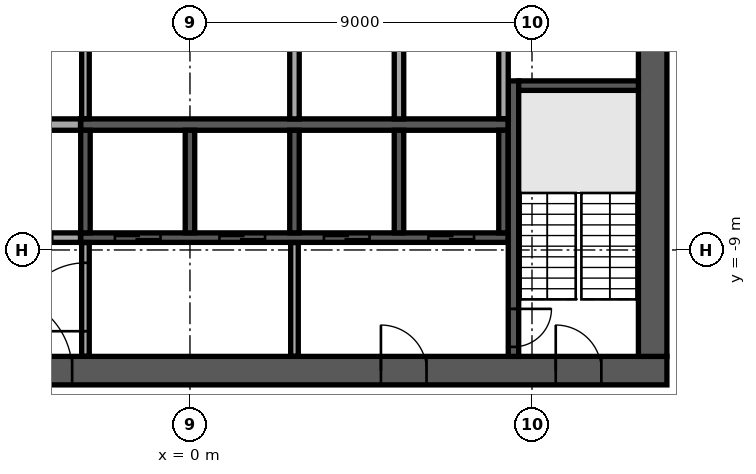
"""IFC4 building model, lengths in metres.
Left out: names, types, materials, properties, quantities, classifications, styles, units other than length and angle.
Written with IfcOpenShell. Run it as: python <this file> out.ifc"""

import sys

from ifc_helpers import new_model, si_unit, direction, frame, frame_2d, origin, place, context, subcontext, project, spatial, rectangle, extrude, element, fill, save


model = new_model("IFC4")
c1 = context("Model", 3, precision=1e-05, world=origin(), true_north=direction((0.0, 1.0)))
c2 = subcontext(c1, "Body", "Model", "MODEL_VIEW")
j1 = project(units=[si_unit("LENGTHUNIT", "METRE"), si_unit("PLANEANGLEUNIT", "RADIAN")], contexts=[c1])
p1 = place(None, origin())
s1 = spatial("IfcSite", under=j1, at=p1, CompositionType="ELEMENT")
p2 = place(p1, origin())
s2 = spatial("IfcBuilding", under=s1, at=p2, CompositionType="ELEMENT")
p3 = place(p2, frame((0.0, 0.0, 282.9)))
s3 = spatial("IfcBuildingStorey", under=s2, at=p3, CompositionType="ELEMENT", Elevation=282.9)
p4 = place(p3, frame((-12.55, -12.175, 0.0), z_axis=(0.0, 0.0, 1.0), x_axis=(1.0, 0.0, 0.0)))
e1 = element("IfcWall", 1, at=p4, inside=s3, PredefinedType="SHEAR", context=c2, shape_type="SweptSolid", body=[
    extrude(rectangle(XDim=25.1, YDim=0.75, at=frame_2d((12.55, 0.0))), origin(), (0.0, 0.0, 1.0), 3.64),
])
p5 = place(p4, frame((7.45, 0.0, 0.0)))
e2 = element("IfcOpeningElement", 2, at=p5, cuts=e1, PredefinedType="OPENING", context=c2, shape_type="SweptSolid", body=[
    extrude(rectangle(XDim=2.0, YDim=2.1, at=frame_2d((1.0, 1.05))), frame((0.0, 0.385, 0.0), z_axis=(0.0, -1.0, 0.0), x_axis=(1.0, 0.0, 0.0)), (0.0, 0.0, 1.0), 0.77),
])
p6 = place(p4, frame((17.575, 0.0, 0.0)))
e3 = element("IfcOpeningElement", 3, at=p6, cuts=e1, PredefinedType="OPENING", context=c2, shape_type="SweptSolid", body=[
    extrude(rectangle(XDim=1.2, YDim=2.1, at=frame_2d((0.6, 1.05))), frame((0.0, 0.385, 0.0), z_axis=(0.0, -1.0, 0.0), x_axis=(1.0, 0.0, 0.0)), (0.0, 0.0, 1.0), 0.77),
])
p7 = place(p4, frame((1.725, 0.0, 0.0)))
e4 = element("IfcOpeningElement", 4, at=p7, cuts=e1, PredefinedType="OPENING", context=c2, shape_type="SweptSolid", body=[
    extrude(rectangle(XDim=1.2, YDim=2.1, at=frame_2d((0.6, 1.05))), frame((0.0, 0.385, 0.0), z_axis=(0.0, -1.0, 0.0), x_axis=(1.0, 0.0, 0.0)), (0.0, 0.0, 1.0), 0.77),
])
p8 = place(p4, frame((22.175, 0.0, 0.0)))
e5 = element("IfcOpeningElement", 5, at=p8, cuts=e1, PredefinedType="OPENING", context=c2, shape_type="SweptSolid", body=[
    extrude(rectangle(XDim=1.2, YDim=2.1, at=frame_2d((0.6, 1.05))), frame((0.0, 0.385, 0.0), z_axis=(0.0, -1.0, 0.0), x_axis=(1.0, 0.0, 0.0)), (0.0, 0.0, 1.0), 0.77),
])
p9 = place(p3, frame((12.175, -11.8, 0.0), z_axis=(0.0, 0.0, 1.0), x_axis=(0.0, 1.0, 0.0)))
e6 = element("IfcWall", 6, at=p9, inside=s3, PredefinedType="SHEAR", context=c2, shape_type="SweptSolid", body=[
    extrude(rectangle(XDim=23.6, YDim=0.75, at=frame_2d((11.8, 0.0))), origin(), (0.0, 0.0, 1.0), 3.64),
])
p10 = place(p9, frame((10.6, 0.0, 0.0)))
e7 = element("IfcOpeningElement", 7, at=p10, cuts=e6, PredefinedType="OPENING", context=c2, shape_type="SweptSolid", body=[
    extrude(rectangle(XDim=2.4, YDim=2.4, at=frame_2d((1.2, 1.2))), frame((0.0, 0.385, 0.0), z_axis=(0.0, -1.0, 0.0), x_axis=(1.0, 0.0, 0.0)), (0.0, 0.0, 1.0), 0.77),
])
p11 = place(p3, frame((-2.875, -5.7, 0.0), z_axis=(0.0, 0.0, 1.0), x_axis=(1.0, 0.0, 0.0)))
e8 = element("IfcWall", 8, at=p11, inside=s3, PredefinedType="SOLIDWALL", context=c2, shape_type="SweptSolid", body=[
    extrude(rectangle(XDim=11.25, YDim=0.3, at=frame_2d((5.625, 0.0))), origin(), (0.0, 0.0, 1.0), 3.64),
])
for number, where, z_axis, x_axis in (
    (9, (2.75, -5.55, 0.0), (0.0, 0.0, 1.0), (0.0, 1.0, 0.0)),
    (10, (5.5, -5.55, 0.0), (0.0, 0.0, 1.0), (0.0, 1.0, 0.0)),
):
    element("IfcWall", number, at=place(p3, frame(where, z_axis=z_axis, x_axis=x_axis)), inside=s3, PredefinedType="SOLIDWALL", context=c2, shape_type="SweptSolid", body=[
        extrude(rectangle(XDim=2.7, YDim=0.25, at=frame_2d((1.35, 0.0))), origin(), (0.0, 0.0, 1.0), 3.64),
    ])
p12 = place(p3, frame((-2.875, -8.675, 0.0), z_axis=(0.0, 0.0, 1.0), x_axis=(1.0, 0.0, 0.0)))
e11 = element("IfcWall", 11, at=p12, inside=s3, PredefinedType="SOLIDWALL", context=c2, shape_type="SweptSolid", body=[
    extrude(rectangle(XDim=11.25, YDim=0.25, at=frame_2d((5.625, 0.0))), origin(), (0.0, 0.0, 1.0), 3.64),
])
p13 = place(p12, frame((0.9, 0.0, 0.0)))
e12 = element("IfcOpeningElement", 12, at=p13, cuts=e11, PredefinedType="OPENING", context=c2, shape_type="SweptSolid", body=[
    extrude(rectangle(XDim=1.2, YDim=2.1, at=frame_2d((0.6, 1.05))), frame((0.0, 0.135, 0.0), z_axis=(0.0, -1.0, 0.0), x_axis=(1.0, 0.0, 0.0)), (0.0, 0.0, 1.0), 0.27),
])
p14 = place(p12, frame((3.65, 0.0, 0.0)))
e13 = element("IfcOpeningElement", 13, at=p14, cuts=e11, PredefinedType="OPENING", context=c2, shape_type="SweptSolid", body=[
    extrude(rectangle(XDim=1.2, YDim=2.1, at=frame_2d((0.6, 1.05))), frame((0.0, 0.135, 0.0), z_axis=(0.0, -1.0, 0.0), x_axis=(1.0, 0.0, 0.0)), (0.0, 0.0, 1.0), 0.27),
])
p15 = place(p12, frame((6.4, 0.0, 0.0)))
e14 = element("IfcOpeningElement", 14, at=p15, cuts=e11, PredefinedType="OPENING", context=c2, shape_type="SweptSolid", body=[
    extrude(rectangle(XDim=1.2, YDim=2.1, at=frame_2d((0.6, 1.05))), frame((0.0, 0.135, 0.0), z_axis=(0.0, -1.0, 0.0), x_axis=(1.0, 0.0, 0.0)), (0.0, 0.0, 1.0), 0.27),
])
p16 = place(p12, frame((9.15, 0.0, 0.0)))
e15 = element("IfcOpeningElement", 15, at=p16, cuts=e11, PredefinedType="OPENING", context=c2, shape_type="SweptSolid", body=[
    extrude(rectangle(XDim=1.2, YDim=2.1, at=frame_2d((0.6, 1.05))), frame((0.0, 0.135, 0.0), z_axis=(0.0, -1.0, 0.0), x_axis=(1.0, 0.0, 0.0)), (0.0, 0.0, 1.0), 0.27),
])
for number, where, z_axis, x_axis in (
    (16, (-2.75, -8.55, 0.0), (0.0, 0.0, 1.0), (0.0, 1.0, 0.0)),
    (17, (0.0, -8.55, 0.0), (0.0, 0.0, 1.0), (0.0, 1.0, 0.0)),
    (18, (2.75, -8.55, 0.0), (0.0, 0.0, 1.0), (0.0, 1.0, 0.0)),
    (19, (5.5, -8.55, 0.0), (0.0, 0.0, 1.0), (0.0, 1.0, 0.0)),
    (20, (8.25, -8.55, 0.0), (0.0, 0.0, 1.0), (0.0, 1.0, 0.0)),
):
    element("IfcWall", number, at=place(p3, frame(where, z_axis=z_axis, x_axis=x_axis)), inside=s3, PredefinedType="SOLIDWALL", context=c2, shape_type="SweptSolid", body=[
        extrude(rectangle(XDim=2.7, YDim=0.25, at=frame_2d((1.35, 0.0))), origin(), (0.0, 0.0, 1.0), 3.64),
    ])
p17 = place(p3, frame((8.512, -4.55, 0.0), z_axis=(0.0, 0.0, 1.0), x_axis=(0.0, -1.0, 0.0)))
e21 = element("IfcWall", 21, at=p17, inside=s3, PredefinedType="SOLIDWALL", context=c2, shape_type="SweptSolid", body=[
    extrude(rectangle(XDim=7.25, YDim=0.275, at=frame_2d((3.625, 0.0))), origin(), (0.0, 0.0, 1.0), 3.64),
])
p18 = place(p17, frame((6.0, 0.0, 0.0)))
e22 = element("IfcOpeningElement", 22, at=p18, cuts=e21, PredefinedType="OPENING", context=c2, shape_type="SweptSolid", body=[
    extrude(rectangle(XDim=1.0, YDim=2.1, at=frame_2d((0.5, 1.05))), frame((0.0, 0.147, 0.0), z_axis=(0.0, -1.0, 0.0), x_axis=(1.0, 0.0, 0.0)), (0.0, 0.0, 1.0), 0.295),
])
p19 = place(p3, frame((8.65, -4.675, 0.0), z_axis=(0.0, 0.0, 1.0), x_axis=(1.0, 0.0, 0.0)))
e23 = element("IfcWall", 23, at=p19, inside=s3, PredefinedType="SOLIDWALL", context=c2, shape_type="SweptSolid", body=[
    extrude(rectangle(XDim=3.15, YDim=0.25, at=frame_2d((1.575, 0.0))), origin(), (0.0, 0.0, 1.0), 3.64),
])
p20 = place(p3, frame((-2.75, -11.795, 0.0), z_axis=(0.0, 0.0, 1.0), x_axis=(0.0, 1.0, 0.0)))
e24 = element("IfcWall", 24, at=p20, inside=s3, PredefinedType="PARTITIONING", context=c2, shape_type="SweptSolid", body=[
    extrude(rectangle(XDim=2.99, YDim=0.2, at=frame_2d((1.495, 0.0))), origin(), (0.0, 0.0, 1.0), 3.64),
])
p21 = place(p20, frame((0.657, 0.0, 0.0)))
e25 = element("IfcOpeningElement", 25, at=p21, cuts=e24, PredefinedType="OPENING", context=c2, shape_type="SweptSolid", body=[
    extrude(rectangle(XDim=1.8, YDim=2.1, at=frame_2d((0.9, 1.05))), frame((0.0, 0.11, 0.0), z_axis=(0.0, -1.0, 0.0), x_axis=(1.0, 0.0, 0.0)), (0.0, 0.0, 1.0), 0.22),
])
p22 = place(p3, frame((2.75, -11.795, 0.0), z_axis=(0.0, 0.0, 1.0), x_axis=(0.0, 1.0, 0.0)))
e26 = element("IfcWall", 26, at=p22, inside=s3, PredefinedType="PARTITIONING", context=c2, shape_type="SweptSolid", body=[
    extrude(rectangle(XDim=2.99, YDim=0.2, at=frame_2d((1.495, 0.0))), origin(), (0.0, 0.0, 1.0), 3.64),
])
p23 = place(p3, frame((-8.37, -8.675, 0.0), z_axis=(0.0, 0.0, 1.0), x_axis=(1.0, 0.0, 0.0)))
e27 = element("IfcWall", 27, at=p23, inside=s3, PredefinedType="PARTITIONING", context=c2, shape_type="SweptSolid", body=[
    extrude(rectangle(XDim=5.49, YDim=0.25, at=frame_2d((2.745, 0.0))), origin(), (0.0, 0.0, 1.0), 3.64),
])
p24 = place(p23, frame((0.995, 0.0, 0.0)))
e28 = element("IfcOpeningElement", 28, at=p24, cuts=e27, PredefinedType="OPENING", context=c2, shape_type="SweptSolid", body=[
    extrude(rectangle(XDim=1.0, YDim=2.1, at=frame_2d((0.5, 1.05))), frame((0.0, 0.135, 0.0), z_axis=(0.0, -1.0, 0.0), x_axis=(1.0, 0.0, 0.0)), (0.0, 0.0, 1.0), 0.27),
])
p25 = place(p23, frame((3.745, 0.0, 0.0)))
e29 = element("IfcOpeningElement", 29, at=p25, cuts=e27, PredefinedType="OPENING", context=c2, shape_type="SweptSolid", body=[
    extrude(rectangle(XDim=1.0, YDim=2.1, at=frame_2d((0.5, 1.05))), frame((0.0, 0.135, 0.0), z_axis=(0.0, -1.0, 0.0), x_axis=(1.0, 0.0, 0.0)), (0.0, 0.0, 1.0), 0.27),
])
p26 = place(p3, frame((-8.35, -5.7, 0.0), z_axis=(0.0, 0.0, 1.0), x_axis=(1.0, 0.0, 0.0)))
e30 = element("IfcWall", 30, at=p26, inside=s3, PredefinedType="PARTITIONING", context=c2, shape_type="SweptSolid", body=[
    extrude(rectangle(XDim=5.47, YDim=0.3, at=frame_2d((2.735, 0.0))), origin(), (0.0, 0.0, 1.0), 3.64),
])
p27 = place(p3, frame((-2.75, -5.545, 0.0), z_axis=(0.0, 0.0, 1.0), x_axis=(0.0, 1.0, 0.0)))
e31 = element("IfcWall", 31, at=p27, inside=s3, PredefinedType="PARTITIONING", context=c2, shape_type="SweptSolid", body=[
    extrude(rectangle(XDim=2.69, YDim=0.2, at=frame_2d((1.345, 0.0))), origin(), (0.0, 0.0, 1.0), 3.64),
])
p28 = place(p3, frame((8.25, -5.545, 0.0), z_axis=(0.0, 0.0, 1.0), x_axis=(0.0, 1.0, 0.0)))
e32 = element("IfcWall", 32, at=p28, inside=s3, PredefinedType="PARTITIONING", context=c2, shape_type="SweptSolid", body=[
    extrude(rectangle(XDim=2.69, YDim=0.25, at=frame_2d((1.345, 0.0))), origin(), (0.0, 0.0, 1.0), 3.64),
])
p29 = place(p3, frame((10.36, -32.137, 0.0), z_axis=(0.0, 0.0, 1.0), x_axis=(0.438372256832, 0.898793504894, 0.0)))
e33 = element("IfcWall", 33, at=p29, inside=s3, PredefinedType="STANDARD", context=c2, shape_type="SweptSolid", body=[
    extrude(rectangle(XDim=48.687, YDim=0.6, at=frame_2d((24.343, 0.0))), origin(), (0.0, 0.0, 1.0), 3.64),
])
p30 = place(p29, frame((1.213, 0.0, 0.9)))
e34 = element("IfcOpeningElement", 34, at=p30, cuts=e33, PredefinedType="OPENING", context=c2, shape_type="SweptSolid", body=[
    extrude(rectangle(XDim=2.0, YDim=2.1, at=frame_2d((1.0, 1.05))), frame((0.0, 0.31, 0.0), z_axis=(0.0, -1.0, 0.0), x_axis=(1.0, 0.0, 0.0)), (0.0, 0.0, 1.0), 0.62),
])
p31 = place(p29, frame((5.639, 0.0, 0.9)))
e35 = element("IfcOpeningElement", 35, at=p31, cuts=e33, PredefinedType="OPENING", context=c2, shape_type="SweptSolid", body=[
    extrude(rectangle(XDim=2.0, YDim=2.1, at=frame_2d((1.0, 1.05))), frame((0.0, 0.31, 0.0), z_axis=(0.0, -1.0, 0.0), x_axis=(1.0, 0.0, 0.0)), (0.0, 0.0, 1.0), 0.62),
])
p32 = place(p29, frame((10.065, 0.0, 0.9)))
e36 = element("IfcOpeningElement", 36, at=p32, cuts=e33, PredefinedType="OPENING", context=c2, shape_type="SweptSolid", body=[
    extrude(rectangle(XDim=2.0, YDim=2.1, at=frame_2d((1.0, 1.05))), frame((0.0, 0.31, 0.0), z_axis=(0.0, -1.0, 0.0), x_axis=(1.0, 0.0, 0.0)), (0.0, 0.0, 1.0), 0.62),
])
p33 = place(p29, frame((14.491, 0.0, 0.9)))
e37 = element("IfcOpeningElement", 37, at=p33, cuts=e33, PredefinedType="OPENING", context=c2, shape_type="SweptSolid", body=[
    extrude(rectangle(XDim=2.0, YDim=2.1, at=frame_2d((1.0, 1.05))), frame((0.0, 0.31, 0.0), z_axis=(0.0, -1.0, 0.0), x_axis=(1.0, 0.0, 0.0)), (0.0, 0.0, 1.0), 0.62),
])
p34 = place(p29, frame((18.917, 0.0, 0.9)))
e38 = element("IfcOpeningElement", 38, at=p34, cuts=e33, PredefinedType="OPENING", context=c2, shape_type="SweptSolid", body=[
    extrude(rectangle(XDim=2.0, YDim=2.1, at=frame_2d((1.0, 1.05))), frame((0.0, 0.31, 0.0), z_axis=(0.0, -1.0, 0.0), x_axis=(1.0, 0.0, 0.0)), (0.0, 0.0, 1.0), 0.62),
])
p35 = place(p29, frame((23.343, 0.0, 0.9)))
e39 = element("IfcOpeningElement", 39, at=p35, cuts=e33, PredefinedType="OPENING", context=c2, shape_type="SweptSolid", body=[
    extrude(rectangle(XDim=2.0, YDim=2.1, at=frame_2d((1.0, 1.05))), frame((0.0, 0.31, 0.0), z_axis=(0.0, -1.0, 0.0), x_axis=(1.0, 0.0, 0.0)), (0.0, 0.0, 1.0), 0.62),
])
p36 = place(p29, frame((27.769, 0.0, 0.9)))
e40 = element("IfcOpeningElement", 40, at=p36, cuts=e33, PredefinedType="OPENING", context=c2, shape_type="SweptSolid", body=[
    extrude(rectangle(XDim=2.0, YDim=2.1, at=frame_2d((1.0, 1.05))), frame((0.0, 0.31, 0.0), z_axis=(0.0, -1.0, 0.0), x_axis=(1.0, 0.0, 0.0)), (0.0, 0.0, 1.0), 0.62),
])
p37 = place(p29, frame((32.195, 0.0, 0.9)))
e41 = element("IfcOpeningElement", 41, at=p37, cuts=e33, PredefinedType="OPENING", context=c2, shape_type="SweptSolid", body=[
    extrude(rectangle(XDim=2.0, YDim=2.1, at=frame_2d((1.0, 1.05))), frame((0.0, 0.31, 0.0), z_axis=(0.0, -1.0, 0.0), x_axis=(1.0, 0.0, 0.0)), (0.0, 0.0, 1.0), 0.62),
])
p38 = place(p29, frame((36.621, 0.0, 0.9)))
e42 = element("IfcOpeningElement", 42, at=p38, cuts=e33, PredefinedType="OPENING", context=c2, shape_type="SweptSolid", body=[
    extrude(rectangle(XDim=2.0, YDim=2.1, at=frame_2d((1.0, 1.05))), frame((0.0, 0.31, 0.0), z_axis=(0.0, -1.0, 0.0), x_axis=(1.0, 0.0, 0.0)), (0.0, 0.0, 1.0), 0.62),
])
p39 = place(p29, frame((41.047, 0.0, 0.9)))
e43 = element("IfcOpeningElement", 43, at=p39, cuts=e33, PredefinedType="OPENING", context=c2, shape_type="SweptSolid", body=[
    extrude(rectangle(XDim=2.0, YDim=2.1, at=frame_2d((1.0, 1.05))), frame((0.0, 0.31, 0.0), z_axis=(0.0, -1.0, 0.0), x_axis=(1.0, 0.0, 0.0)), (0.0, 0.0, 1.0), 0.62),
])
p40 = place(p29, frame((45.473, 0.0, 0.9)))
e44 = element("IfcOpeningElement", 44, at=p40, cuts=e33, PredefinedType="OPENING", context=c2, shape_type="SweptSolid", body=[
    extrude(rectangle(XDim=2.0, YDim=2.1, at=frame_2d((1.0, 1.05))), frame((0.0, 0.31, 0.0), z_axis=(0.0, -1.0, 0.0), x_axis=(1.0, 0.0, 0.0)), (0.0, 0.0, 1.0), 0.62),
])
p41 = place(p3, frame((-26.175, -8.898, 0.0), z_axis=(0.0, 0.0, 1.0), x_axis=(0.898795233888, -0.438368711864, 0.0)))
e45 = element("IfcWall", 45, at=p41, inside=s3, PredefinedType="PARTITIONING", context=c2, shape_type="SweptSolid", body=[
    extrude(rectangle(XDim=39.325, YDim=0.15, at=frame_2d((19.663, 0.0))), origin(), (0.0, 0.0, 1.0), 3.04),
])
p42 = place(p41, frame((5.8, 0.0, 0.0)))
e46 = element("IfcOpeningElement", 46, at=p42, cuts=e45, PredefinedType="OPENING", context=c2, shape_type="SweptSolid", body=[
    extrude(rectangle(XDim=1.8, YDim=2.1, at=frame_2d((0.9, 1.05))), frame((0.0, 0.085, 0.0), z_axis=(0.0, -1.0, 0.0), x_axis=(1.0, 0.0, 0.0)), (0.0, 0.0, 1.0), 0.17),
])
p43 = place(p41, frame((10.827, 0.0, 0.0)))
e47 = element("IfcOpeningElement", 47, at=p43, cuts=e45, PredefinedType="OPENING", context=c2, shape_type="SweptSolid", body=[
    extrude(rectangle(XDim=1.0, YDim=2.1, at=frame_2d((0.5, 1.05))), frame((0.0, 0.085, 0.0), z_axis=(0.0, -1.0, 0.0), x_axis=(1.0, 0.0, 0.0)), (0.0, 0.0, 1.0), 0.17),
])
p44 = place(p41, frame((23.556, 0.0, 0.0)))
e48 = element("IfcOpeningElement", 48, at=p44, cuts=e45, PredefinedType="OPENING", context=c2, shape_type="SweptSolid", body=[
    extrude(rectangle(XDim=1.0, YDim=2.1, at=frame_2d((0.5, 1.05))), frame((0.0, 0.085, 0.0), z_axis=(0.0, -1.0, 0.0), x_axis=(1.0, 0.0, 0.0)), (0.0, 0.0, 1.0), 0.17),
])
p45 = place(p5, origin())
e49 = element("IfcDoor", 49, at=p45, inside=s3, OperationType="SINGLE_SWING_LEFT", PredefinedType="DOOR", context=c2, shape_type="SweptSolid", body=[
    extrude(rectangle(XDim=2.0, YDim=2.1, at=frame_2d((1.0, 1.05))), frame((0.0, 0.025, 0.0), z_axis=(0.0, -1.0, 0.0), x_axis=(1.0, 0.0, 0.0)), (0.0, 0.0, 1.0), 0.05),
])
fill(e2, e49)
p46 = place(p6, origin())
e50 = element("IfcDoor", 50, at=p46, inside=s3, OperationType="SINGLE_SWING_LEFT", PredefinedType="DOOR", context=c2, shape_type="SweptSolid", body=[
    extrude(rectangle(XDim=1.2, YDim=2.1, at=frame_2d((0.6, 1.05))), frame((0.0, 0.025, 0.0), z_axis=(0.0, -1.0, 0.0), x_axis=(1.0, 0.0, 0.0)), (0.0, 0.0, 1.0), 0.05),
])
fill(e3, e50)
p47 = place(p8, origin())
e51 = element("IfcDoor", 51, at=p47, inside=s3, OperationType="SINGLE_SWING_LEFT", PredefinedType="DOOR", context=c2, shape_type="SweptSolid", body=[
    extrude(rectangle(XDim=1.2, YDim=2.1, at=frame_2d((0.6, 1.05))), frame((0.0, 0.025, 0.0), z_axis=(0.0, -1.0, 0.0), x_axis=(1.0, 0.0, 0.0)), (0.0, 0.0, 1.0), 0.05),
])
fill(e5, e51)
p48 = place(p13, origin())
e52 = element("IfcDoor", 52, at=p48, inside=s3, OperationType="DOUBLE_DOOR_SLIDING", PredefinedType="DOOR", context=c2, shape_type="SweptSolid", body=[
    extrude(rectangle(XDim=1.2, YDim=2.1, at=frame_2d((0.6, 1.05))), frame((0.0, 0.025, 0.0), z_axis=(0.0, -1.0, 0.0), x_axis=(1.0, 0.0, 0.0)), (0.0, 0.0, 1.0), 0.05),
])
fill(e12, e52)
p49 = place(p14, origin())
e53 = element("IfcDoor", 53, at=p49, inside=s3, OperationType="DOUBLE_DOOR_SLIDING", PredefinedType="DOOR", context=c2, shape_type="SweptSolid", body=[
    extrude(rectangle(XDim=1.2, YDim=2.1, at=frame_2d((0.6, 1.05))), frame((0.0, 0.025, 0.0), z_axis=(0.0, -1.0, 0.0), x_axis=(1.0, 0.0, 0.0)), (0.0, 0.0, 1.0), 0.05),
])
fill(e13, e53)
p50 = place(p15, origin())
e54 = element("IfcDoor", 54, at=p50, inside=s3, OperationType="DOUBLE_DOOR_SLIDING", PredefinedType="DOOR", context=c2, shape_type="SweptSolid", body=[
    extrude(rectangle(XDim=1.2, YDim=2.1, at=frame_2d((0.6, 1.05))), frame((0.0, 0.025, 0.0), z_axis=(0.0, -1.0, 0.0), x_axis=(1.0, 0.0, 0.0)), (0.0, 0.0, 1.0), 0.05),
])
fill(e14, e54)
p51 = place(p16, origin())
e55 = element("IfcDoor", 55, at=p51, inside=s3, OperationType="DOUBLE_DOOR_SLIDING", PredefinedType="DOOR", context=c2, shape_type="SweptSolid", body=[
    extrude(rectangle(XDim=1.2, YDim=2.1, at=frame_2d((0.6, 1.05))), frame((0.0, 0.025, 0.0), z_axis=(0.0, -1.0, 0.0), x_axis=(1.0, 0.0, 0.0)), (0.0, 0.0, 1.0), 0.05),
])
fill(e15, e55)
p52 = place(p18, origin())
e56 = element("IfcDoor", 56, at=p52, inside=s3, OperationType="SINGLE_SWING_LEFT", PredefinedType="DOOR", context=c2, shape_type="SweptSolid", body=[
    extrude(rectangle(XDim=1.0, YDim=2.1, at=frame_2d((0.5, 1.05))), frame((0.0, 0.025, 0.0), z_axis=(0.0, -1.0, 0.0), x_axis=(1.0, 0.0, 0.0)), (0.0, 0.0, 1.0), 0.05),
])
fill(e22, e56)
p53 = place(p21, origin())
e57 = element("IfcDoor", 57, at=p53, inside=s3, OperationType="SINGLE_SWING_LEFT", PredefinedType="DOOR", context=c2, shape_type="SweptSolid", body=[
    extrude(rectangle(XDim=1.8, YDim=2.1, at=frame_2d((0.9, 1.05))), frame((0.0, 0.025, 0.0), z_axis=(0.0, -1.0, 0.0), x_axis=(1.0, 0.0, 0.0)), (0.0, 0.0, 1.0), 0.05),
])
fill(e25, e57)
save(model, sys.argv[1])
